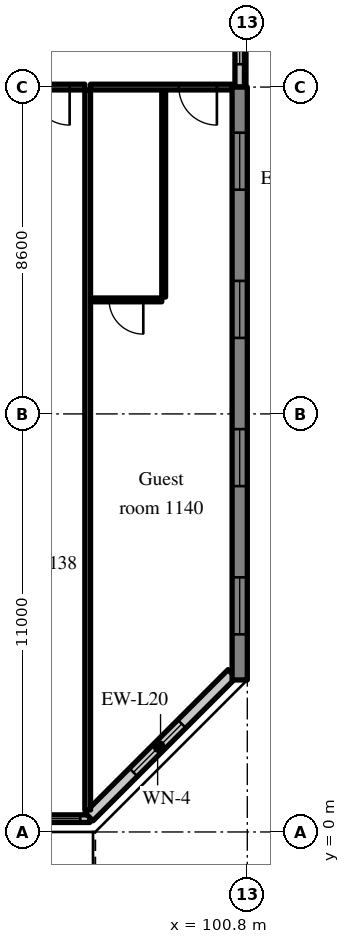
"""IFC4 building model, lengths in metres.
Left out: names, types, materials, properties, quantities, classifications, styles, units other than length and angle.
Written with IfcOpenShell. Run it as: python <this file> out.ifc"""

import sys

from ifc_helpers import new_model, si_unit, direction, frame, frame_2d, origin, place, context, subcontext, project, spatial, rectangle, extrude, source, transform, mapped, element, fill, save


model = new_model("IFC4")
c1 = context("Model", 3, precision=1e-05, world=origin(), true_north=direction((0.0, 1.0)))
c2 = subcontext(c1, "Body", "Model", "MODEL_VIEW")
j1 = project(units=[si_unit("LENGTHUNIT", "METRE"), si_unit("PLANEANGLEUNIT", "RADIAN")], contexts=[c1])
p1 = place(None, origin())
s1 = spatial("IfcSite", under=j1, at=p1, CompositionType="ELEMENT")
p2 = place(p1, origin())
s2 = spatial("IfcBuilding", under=s1, at=p2, CompositionType="ELEMENT")
p3 = place(p2, frame((0.0, 0.0, 50.6)))
s3 = spatial("IfcBuildingStorey", under=s2, at=p3, CompositionType="ELEMENT", Elevation=50.6)
m1 = source(origin(), c2, "Body", "SweptSolid", [
    extrude(rectangle(XDim=15.6, YDim=0.4, at=frame_2d((7.8, 0.0))), origin(), (0.0, 0.0, 1.0), 3.52),
])
p4 = place(p3, frame((100.6, 4.0, 0.0), z_axis=(0.0, 0.0, 1.0), x_axis=(0.0, 1.0, 0.0)))
e1 = element("IfcWall", 1, at=p4, inside=s3, PredefinedType="SHEAR", context=c2, shape_type="MappedRepresentation", body=[
    mapped(m1, transform((0.0, 0.0, 0.0), scale=1.0)),
])
m2 = source(origin(), c2, "Body", "SweptSolid", [
    extrude(rectangle(XDim=1.5, YDim=1.5, at=frame_2d((0.75, 0.75))), frame((0.0, 0.21, 0.0), z_axis=(0.0, -1.0, 0.0), x_axis=(1.0, 0.0, 0.0)), (0.0, 0.0, 1.0), 0.42),
])
p5 = place(p4, frame((1.2, 0.0, 0.9)))
e2 = element("IfcOpeningElement", 2, at=p5, cuts=e1, PredefinedType="OPENING", context=c2, shape_type="MappedRepresentation", body=[
    mapped(m2, transform((0.0, 0.0, 0.0), scale=1.0)),
])
p6 = place(p4, frame((5.1, 0.0, 0.9)))
e3 = element("IfcOpeningElement", 3, at=p6, cuts=e1, PredefinedType="OPENING", context=c2, shape_type="MappedRepresentation", body=[
    mapped(m2, transform((0.0, 0.0, 0.0), scale=1.0)),
])
p7 = place(p4, frame((9.0, 0.0, 0.9)))
e4 = element("IfcOpeningElement", 4, at=p7, cuts=e1, PredefinedType="OPENING", context=c2, shape_type="MappedRepresentation", body=[
    mapped(m2, transform((0.0, 0.0, 0.0), scale=1.0)),
])
p8 = place(p4, frame((12.9, 0.0, 0.9)))
e5 = element("IfcOpeningElement", 5, at=p8, cuts=e1, PredefinedType="OPENING", context=c2, shape_type="MappedRepresentation", body=[
    mapped(m2, transform((0.0, 0.0, 0.0), scale=1.0)),
])
m3 = source(origin(), c2, "Body", "SweptSolid", [
    extrude(rectangle(XDim=4.055, YDim=0.2, at=frame_2d((2.027, 0.0))), origin(), (0.0, 0.0, 1.0), 2.82),
])
p9 = place(p3, frame((92.6, 0.35, 0.0), z_axis=(0.0, 0.0, 1.0), x_axis=(1.0, 0.0, 0.0)))
e6 = element("IfcWall", 6, at=p9, inside=s3, PredefinedType="SOLIDWALL", context=c2, shape_type="MappedRepresentation", body=[
    mapped(m3, transform((0.0, 0.0, 0.0), scale=1.0)),
])
m4 = source(origin(), c2, "Body", "SweptSolid", [
    extrude(rectangle(XDim=1.2, YDim=2.4, at=frame_2d((0.6, 1.2))), frame((0.0, 0.11, 0.0), z_axis=(0.0, -1.0, 0.0), x_axis=(1.0, 0.0, 0.0)), (0.0, 0.0, 1.0), 0.22),
])
p10 = place(p9, frame((0.25, 0.0, 0.0)))
e7 = element("IfcOpeningElement", 7, at=p10, cuts=e6, PredefinedType="OPENING", context=c2, shape_type="MappedRepresentation", body=[
    mapped(m4, transform((0.0, 0.0, 0.0), scale=1.0)),
])
m5 = source(origin(), c2, "Body", "SweptSolid", [
    extrude(rectangle(XDim=1.5, YDim=1.5, at=frame_2d((0.75, 0.75))), frame((0.0, 0.11, 0.0), z_axis=(0.0, -1.0, 0.0), x_axis=(1.0, 0.0, 0.0)), (0.0, 0.0, 1.0), 0.22),
])
p11 = place(p9, frame((2.305, 0.0, 0.9)))
e8 = element("IfcOpeningElement", 8, at=p11, cuts=e6, PredefinedType="OPENING", context=c2, shape_type="MappedRepresentation", body=[
    mapped(m5, transform((0.0, 0.0, 0.0), scale=1.0)),
])
m6 = source(origin(), c2, "Body", "SweptSolid", [
    extrude(rectangle(XDim=5.326, YDim=0.3, at=frame_2d((2.663, 0.0))), origin(), (0.0, 0.0, 1.0), 3.52),
])
p12 = place(p3, frame((96.634, 0.4, 0.0), z_axis=(0.0, 0.0, 1.0), x_axis=(0.707083859269, 0.707129702361, 0.0)))
e9 = element("IfcWall", 9, at=p12, inside=s3, PredefinedType="SOLIDWALL", context=c2, shape_type="MappedRepresentation", body=[
    mapped(m6, transform((0.0, 0.0, 0.0), scale=1.0)),
])
m7 = source(origin(), c2, "Body", "SweptSolid", [
    extrude(rectangle(XDim=1.8, YDim=1.5, at=frame_2d((0.9, 0.75))), frame((0.0, 0.16, 0.0), z_axis=(0.0, -1.0, 0.0), x_axis=(1.0, 0.0, 0.0)), (0.0, 0.0, 1.0), 0.32),
])
p13 = place(p12, frame((1.654, 0.0, 0.9)))
e10 = element("IfcOpeningElement", 10, at=p13, cuts=e9, PredefinedType="OPENING", context=c2, shape_type="MappedRepresentation", body=[
    mapped(m7, transform((0.0, 0.0, 0.0), scale=1.0)),
])
m8 = source(origin(), c2, "Body", "SweptSolid", [
    extrude(rectangle(XDim=2.4, YDim=0.25, at=frame_2d((1.2, 0.0))), origin(), (0.0, 0.0, 1.0), 2.62),
])
p14 = place(p3, frame((100.6, 19.6, 0.0), z_axis=(0.0, 0.0, 1.0), x_axis=(0.0, 1.0, 0.0)))
e11 = element("IfcWall", 11, at=p14, inside=s3, PredefinedType="SOLIDWALL", context=c2, shape_type="MappedRepresentation", body=[
    mapped(m8, transform((0.0, 0.0, 0.0), scale=1.0)),
])
m9 = source(origin(), c2, "Body", "SweptSolid", [
    extrude(rectangle(XDim=1.2, YDim=1.5, at=frame_2d((0.6, 0.75))), frame((0.0, 0.135, 0.0), z_axis=(0.0, -1.0, 0.0), x_axis=(1.0, 0.0, 0.0)), (0.0, 0.0, 1.0), 0.27),
])
p15 = place(p14, frame((0.6, 0.0, 0.9)))
e12 = element("IfcOpeningElement", 12, at=p15, cuts=e11, PredefinedType="OPENING", context=c2, shape_type="MappedRepresentation", body=[
    mapped(m9, transform((0.0, 0.0, 0.0), scale=1.0)),
])
m10 = source(origin(), c2, "Body", "SweptSolid", [
    extrude(rectangle(XDim=3.925, YDim=0.15, at=frame_2d((1.962, 0.0))), origin(), (0.0, 0.0, 1.0), 2.82),
])
p16 = place(p3, frame((92.6, 19.6, 0.0), z_axis=(0.0, 0.0, 1.0), x_axis=(1.0, 0.0, 0.0)))
e13 = element("IfcWall", 13, at=p16, inside=s3, PredefinedType="PARTITIONING", context=c2, shape_type="MappedRepresentation", body=[
    mapped(m10, transform((0.0, 0.0, 0.0), scale=1.0)),
])
m11 = source(origin(), c2, "Body", "SweptSolid", [
    extrude(rectangle(XDim=1.0, YDim=2.1, at=frame_2d((0.5, 1.05))), frame((0.0, 0.085, 0.0), z_axis=(0.0, -1.0, 0.0), x_axis=(1.0, 0.0, 0.0)), (0.0, 0.0, 1.0), 0.17),
])
p17 = place(p16, frame((2.525, 0.0, 0.0)))
e14 = element("IfcOpeningElement", 14, at=p17, cuts=e13, PredefinedType="OPENING", context=c2, shape_type="MappedRepresentation", body=[
    mapped(m11, transform((0.0, 0.0, 0.0), scale=1.0)),
])
m12 = source(origin(), c2, "Body", "SweptSolid", [
    extrude(rectangle(XDim=5.45, YDim=0.1, at=frame_2d((2.725, 0.0))), origin(), (0.0, 0.0, 1.0), 3.52),
])
p18 = place(p3, frame((98.6, 14.075, 0.0), z_axis=(0.0, 0.0, 1.0), x_axis=(0.0, 1.0, 0.0)))
e15 = element("IfcWall", 15, at=p18, inside=s3, PredefinedType="PARTITIONING", context=c2, shape_type="MappedRepresentation", body=[
    mapped(m12, transform((0.0, 0.0, 0.0), scale=1.0)),
])
m13 = source(origin(), c2, "Body", "SweptSolid", [
    extrude(rectangle(XDim=1.875, YDim=0.1, at=frame_2d((0.938, 0.0))), origin(), (0.0, 0.0, 1.0), 3.52),
])
p19 = place(p3, frame((96.675, 14.0, 0.0), z_axis=(0.0, 0.0, 1.0), x_axis=(1.0, 0.0, 0.0)))
e16 = element("IfcWall", 16, at=p19, inside=s3, PredefinedType="PARTITIONING", context=c2, shape_type="MappedRepresentation", body=[
    mapped(m13, transform((0.0, 0.0, 0.0), scale=1.0)),
])
m14 = source(origin(), c2, "Body", "SweptSolid", [
    extrude(rectangle(XDim=0.9, YDim=2.1, at=frame_2d((0.45, 1.05))), frame((0.0, 0.06, 0.0), z_axis=(0.0, -1.0, 0.0), x_axis=(1.0, 0.0, 0.0)), (0.0, 0.0, 1.0), 0.12),
])
p20 = place(p19, frame((0.488, 0.0, 0.0)))
e17 = element("IfcOpeningElement", 17, at=p20, cuts=e16, PredefinedType="OPENING", context=c2, shape_type="MappedRepresentation", body=[
    mapped(m14, transform((0.0, 0.0, 0.0), scale=1.0)),
])
m15 = source(origin(), c2, "Body", "SweptSolid", [
    extrude(rectangle(XDim=3.725, YDim=0.15, at=frame_2d((1.862, 0.0))), origin(), (0.0, 0.0, 1.0), 2.82),
])
p21 = place(p3, frame((96.675, 19.6, 0.0), z_axis=(0.0, 0.0, 1.0), x_axis=(1.0, 0.0, 0.0)))
e18 = element("IfcWall", 18, at=p21, inside=s3, PredefinedType="PARTITIONING", context=c2, shape_type="MappedRepresentation", body=[
    mapped(m15, transform((0.0, 0.0, 0.0), scale=1.0)),
])
p22 = place(p21, frame((2.325, 0.0, 0.0)))
e19 = element("IfcOpeningElement", 19, at=p22, cuts=e18, PredefinedType="OPENING", context=c2, shape_type="MappedRepresentation", body=[
    mapped(m11, transform((0.0, 0.0, 0.0), scale=1.0)),
])
m16 = source(origin(), c2, "Body", "SweptSolid", [
    extrude(rectangle(XDim=18.947, YDim=0.15, at=frame_2d((9.474, 0.0))), origin(), (0.0, 0.0, 1.0), 3.52),
])
p23 = place(p3, frame((96.6, 0.578, 0.0), z_axis=(0.0, 0.0, 1.0), x_axis=(0.0, 1.0, 0.0)))
e20 = element("IfcWall", 20, at=p23, inside=s3, PredefinedType="PARTITIONING", context=c2, shape_type="MappedRepresentation", body=[
    mapped(m16, transform((0.0, 0.0, 0.0), scale=1.0)),
])
m17 = source(origin(), c2, "Body", "SweptSolid", [
    extrude(rectangle(XDim=1.5, YDim=1.5, at=frame_2d((0.75, 0.75))), frame((0.0, 0.03, 0.0), z_axis=(0.0, -1.0, 0.0), x_axis=(1.0, 0.0, 0.0)), (0.0, 0.0, 1.0), 0.06),
])
p24 = place(p11, origin())
e21 = element("IfcWindow", 21, at=p24, inside=s3, PartitioningType="SINGLE_PANEL", PredefinedType="WINDOW", context=c2, shape_type="MappedRepresentation", body=[
    mapped(m17, transform((0.0, 0.0, 0.0), scale=1.0)),
])
fill(e8, e21)
m18 = source(origin(), c2, "Body", "SweptSolid", [
    extrude(rectangle(XDim=1.8, YDim=1.5, at=frame_2d((0.9, 0.75))), frame((0.0, 0.03, 0.0), z_axis=(0.0, -1.0, 0.0), x_axis=(1.0, 0.0, 0.0)), (0.0, 0.0, 1.0), 0.06),
])
p25 = place(p13, origin())
e22 = element("IfcWindow", 22, at=p25, inside=s3, PartitioningType="SINGLE_PANEL", PredefinedType="WINDOW", context=c2, shape_type="MappedRepresentation", body=[
    mapped(m18, transform((0.0, 0.0, 0.0), scale=1.0)),
])
fill(e10, e22)
p26 = place(p5, origin())
e23 = element("IfcWindow", 23, at=p26, inside=s3, PartitioningType="SINGLE_PANEL", PredefinedType="WINDOW", context=c2, shape_type="MappedRepresentation", body=[
    mapped(m17, transform((0.0, 0.0, 0.0), scale=1.0)),
])
fill(e2, e23)
p27 = place(p6, origin())
e24 = element("IfcWindow", 24, at=p27, inside=s3, PartitioningType="SINGLE_PANEL", PredefinedType="WINDOW", context=c2, shape_type="MappedRepresentation", body=[
    mapped(m17, transform((0.0, 0.0, 0.0), scale=1.0)),
])
fill(e3, e24)
p28 = place(p7, origin())
e25 = element("IfcWindow", 25, at=p28, inside=s3, PartitioningType="SINGLE_PANEL", PredefinedType="WINDOW", context=c2, shape_type="MappedRepresentation", body=[
    mapped(m17, transform((0.0, 0.0, 0.0), scale=1.0)),
])
fill(e4, e25)
p29 = place(p8, origin())
e26 = element("IfcWindow", 26, at=p29, inside=s3, PartitioningType="SINGLE_PANEL", PredefinedType="WINDOW", context=c2, shape_type="MappedRepresentation", body=[
    mapped(m17, transform((0.0, 0.0, 0.0), scale=1.0)),
])
fill(e5, e26)
m19 = source(origin(), c2, "Body", "SweptSolid", [
    extrude(rectangle(XDim=1.2, YDim=1.5, at=frame_2d((0.6, 0.75))), frame((0.0, 0.03, 0.0), z_axis=(0.0, -1.0, 0.0), x_axis=(1.0, 0.0, 0.0)), (0.0, 0.0, 1.0), 0.06),
])
p30 = place(p15, origin())
e27 = element("IfcWindow", 27, at=p30, inside=s3, PartitioningType="SINGLE_PANEL", PredefinedType="WINDOW", context=c2, shape_type="MappedRepresentation", body=[
    mapped(m19, transform((0.0, 0.0, 0.0), scale=1.0)),
])
fill(e12, e27)
m20 = source(origin(), c2, "Body", "SweptSolid", [
    extrude(rectangle(XDim=1.0, YDim=2.1, at=frame_2d((0.5, 1.05))), frame((0.0, 0.025, 0.0), z_axis=(0.0, -1.0, 0.0), x_axis=(1.0, 0.0, 0.0)), (0.0, 0.0, 1.0), 0.05),
])
p31 = place(p17, origin())
e28 = element("IfcDoor", 28, at=p31, inside=s3, OperationType="SINGLE_SWING_RIGHT", PredefinedType="DOOR", context=c2, shape_type="MappedRepresentation", body=[
    mapped(m20, transform((0.0, 0.0, 0.0), scale=1.0)),
])
fill(e14, e28)
m21 = source(origin(), c2, "Body", "SweptSolid", [
    extrude(rectangle(XDim=0.9, YDim=2.1, at=frame_2d((0.45, 1.05))), frame((0.0, 0.025, 0.0), z_axis=(0.0, -1.0, 0.0), x_axis=(1.0, 0.0, 0.0)), (0.0, 0.0, 1.0), 0.05),
])
p32 = place(p20, origin())
e29 = element("IfcDoor", 29, at=p32, inside=s3, OperationType="SINGLE_SWING_RIGHT", PredefinedType="DOOR", context=c2, shape_type="MappedRepresentation", body=[
    mapped(m21, transform((0.0, 0.0, 0.0), scale=1.0)),
])
fill(e17, e29)
p33 = place(p22, origin())
e30 = element("IfcDoor", 30, at=p33, inside=s3, OperationType="SINGLE_SWING_RIGHT", PredefinedType="DOOR", context=c2, shape_type="MappedRepresentation", body=[
    mapped(m20, transform((0.0, 0.0, 0.0), scale=1.0)),
])
fill(e19, e30)
save(model, sys.argv[1])
